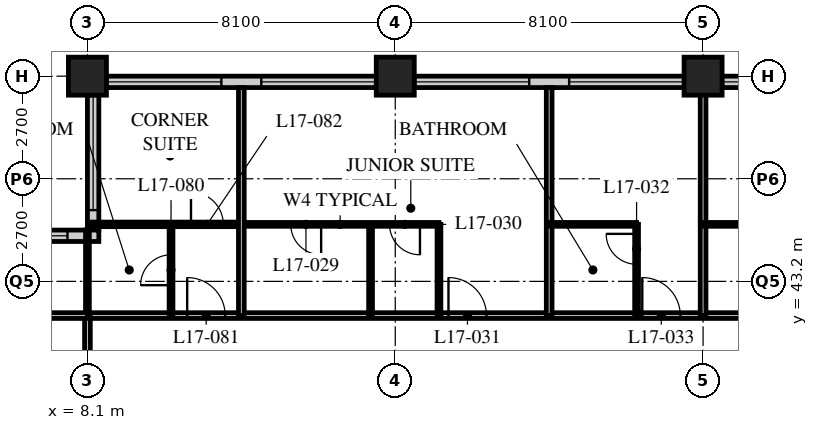
"""IFC4 building model, lengths in metres.
Left out: names, types, materials, properties, quantities, classifications, styles, units other than length and angle.
Written with IfcOpenShell. Run it as: python <this file> out.ifc"""

import sys

from ifc_helpers import new_model, si_unit, direction, frame, frame_2d, origin, origin_2d, place, context, subcontext, project, spatial, rectangle, hollow_rectangle, extrude, element, fill, save


model = new_model("IFC4")
c1 = context("Model", 3, precision=1e-05, world=origin(), true_north=direction((0.0, 1.0)))
c2 = subcontext(c1, "Body", "Model", "MODEL_VIEW")
j1 = project(units=[si_unit("LENGTHUNIT", "METRE"), si_unit("PLANEANGLEUNIT", "RADIAN")], contexts=[c1])
p1 = place(None, origin())
s1 = spatial("IfcSite", under=j1, at=p1, CompositionType="ELEMENT")
p2 = place(p1, origin())
s2 = spatial("IfcBuilding", under=s1, at=p2, CompositionType="ELEMENT")
p3 = place(p2, frame((0.0, 0.0, 70.4)))
s3 = spatial("IfcBuildingStorey", under=s2, at=p3, CompositionType="ELEMENT", Elevation=70.4)
for number, where, z_axis, x_axis in (
    (1, (8.1, 48.6, 0.0), (0.0, 0.0, 1.0), (1.0, 0.0, 0.0)),
    (2, (16.2, 48.6, 0.0), (0.0, 0.0, 1.0), (1.0, 0.0, 0.0)),
    (3, (24.3, 48.6, 0.0), (0.0, 0.0, 1.0), (1.0, 0.0, 0.0)),
):
    element("IfcColumn", number, at=place(p3, frame(where, z_axis=z_axis, x_axis=x_axis)), inside=s3, PredefinedType="COLUMN", context=c2, shape_type="SweptSolid", body=[
        extrude(hollow_rectangle(XDim=1.0, YDim=1.0, WallThickness=0.1, at=origin_2d()), origin(), (0.0, 0.0, 1.0), 3.4),
    ])
p4 = place(p3, frame((48.3, 48.45, 0.0), z_axis=(0.0, 0.0, 1.0), x_axis=(-1.0, 0.0, 0.0)))
e4 = element("IfcWall", 4, at=p4, inside=s3, PredefinedType="SOLIDWALL", context=c2, shape_type="SweptSolid", body=[
    extrude(rectangle(XDim=40.2, YDim=0.3, at=frame_2d((20.1, 0.0))), origin(), (0.0, 0.0, 1.0), 3.19),
])
p5 = place(p4, frame((0.225, 0.0, 0.9)))
e5 = element("IfcOpeningElement", 5, at=p5, cuts=e4, PredefinedType="OPENING", context=c2, shape_type="SweptSolid", body=[
    extrude(rectangle(XDim=3.0, YDim=2.0, at=frame_2d((1.5, 1.0))), frame((0.0, 0.16, 0.0), z_axis=(0.0, -1.0, 0.0), x_axis=(1.0, 0.0, 0.0)), (0.0, 0.0, 1.0), 0.32),
])
p6 = place(p4, frame((4.275, 0.0, 0.9)))
e6 = element("IfcOpeningElement", 6, at=p6, cuts=e4, PredefinedType="OPENING", context=c2, shape_type="SweptSolid", body=[
    extrude(rectangle(XDim=3.0, YDim=2.0, at=frame_2d((1.5, 1.0))), frame((0.0, 0.16, 0.0), z_axis=(0.0, -1.0, 0.0), x_axis=(1.0, 0.0, 0.0)), (0.0, 0.0, 1.0), 0.32),
])
p7 = place(p4, frame((8.325, 0.0, 0.9)))
e7 = element("IfcOpeningElement", 7, at=p7, cuts=e4, PredefinedType="OPENING", context=c2, shape_type="SweptSolid", body=[
    extrude(rectangle(XDim=3.0, YDim=2.0, at=frame_2d((1.5, 1.0))), frame((0.0, 0.16, 0.0), z_axis=(0.0, -1.0, 0.0), x_axis=(1.0, 0.0, 0.0)), (0.0, 0.0, 1.0), 0.32),
])
p8 = place(p4, frame((12.375, 0.0, 0.9)))
e8 = element("IfcOpeningElement", 8, at=p8, cuts=e4, PredefinedType="OPENING", context=c2, shape_type="SweptSolid", body=[
    extrude(rectangle(XDim=3.0, YDim=2.0, at=frame_2d((1.5, 1.0))), frame((0.0, 0.16, 0.0), z_axis=(0.0, -1.0, 0.0), x_axis=(1.0, 0.0, 0.0)), (0.0, 0.0, 1.0), 0.32),
])
p9 = place(p4, frame((16.425, 0.0, 0.9)))
e9 = element("IfcOpeningElement", 9, at=p9, cuts=e4, PredefinedType="OPENING", context=c2, shape_type="SweptSolid", body=[
    extrude(rectangle(XDim=3.0, YDim=2.0, at=frame_2d((1.5, 1.0))), frame((0.0, 0.16, 0.0), z_axis=(0.0, -1.0, 0.0), x_axis=(1.0, 0.0, 0.0)), (0.0, 0.0, 1.0), 0.32),
])
p10 = place(p4, frame((20.475, 0.0, 0.9)))
e10 = element("IfcOpeningElement", 10, at=p10, cuts=e4, PredefinedType="OPENING", context=c2, shape_type="SweptSolid", body=[
    extrude(rectangle(XDim=3.0, YDim=2.0, at=frame_2d((1.5, 1.0))), frame((0.0, 0.16, 0.0), z_axis=(0.0, -1.0, 0.0), x_axis=(1.0, 0.0, 0.0)), (0.0, 0.0, 1.0), 0.32),
])
p11 = place(p4, frame((24.525, 0.0, 0.9)))
e11 = element("IfcOpeningElement", 11, at=p11, cuts=e4, PredefinedType="OPENING", context=c2, shape_type="SweptSolid", body=[
    extrude(rectangle(XDim=3.0, YDim=2.0, at=frame_2d((1.5, 1.0))), frame((0.0, 0.16, 0.0), z_axis=(0.0, -1.0, 0.0), x_axis=(1.0, 0.0, 0.0)), (0.0, 0.0, 1.0), 0.32),
])
p12 = place(p4, frame((28.575, 0.0, 0.9)))
e12 = element("IfcOpeningElement", 12, at=p12, cuts=e4, PredefinedType="OPENING", context=c2, shape_type="SweptSolid", body=[
    extrude(rectangle(XDim=3.0, YDim=2.0, at=frame_2d((1.5, 1.0))), frame((0.0, 0.16, 0.0), z_axis=(0.0, -1.0, 0.0), x_axis=(1.0, 0.0, 0.0)), (0.0, 0.0, 1.0), 0.32),
])
p13 = place(p4, frame((32.625, 0.0, 0.9)))
e13 = element("IfcOpeningElement", 13, at=p13, cuts=e4, PredefinedType="OPENING", context=c2, shape_type="SweptSolid", body=[
    extrude(rectangle(XDim=3.0, YDim=2.0, at=frame_2d((1.5, 1.0))), frame((0.0, 0.16, 0.0), z_axis=(0.0, -1.0, 0.0), x_axis=(1.0, 0.0, 0.0)), (0.0, 0.0, 1.0), 0.32),
])
p14 = place(p4, frame((36.675, 0.0, 0.9)))
e14 = element("IfcOpeningElement", 14, at=p14, cuts=e4, PredefinedType="OPENING", context=c2, shape_type="SweptSolid", body=[
    extrude(rectangle(XDim=3.0, YDim=2.0, at=frame_2d((1.5, 1.0))), frame((0.0, 0.16, 0.0), z_axis=(0.0, -1.0, 0.0), x_axis=(1.0, 0.0, 0.0)), (0.0, 0.0, 1.0), 0.32),
])
p15 = place(p3, frame((8.25, 48.3, 0.0), z_axis=(0.0, 0.0, 1.0), x_axis=(0.0, -1.0, 0.0)))
e15 = element("IfcWall", 15, at=p15, inside=s3, PredefinedType="SOLIDWALL", context=c2, shape_type="SweptSolid", body=[
    extrude(rectangle(XDim=3.75, YDim=0.3, at=frame_2d((1.875, 0.0))), origin(), (0.0, 0.0, 1.0), 3.19),
])
p16 = place(p15, frame((0.225, 0.0, 0.9)))
e16 = element("IfcOpeningElement", 16, at=p16, cuts=e15, PredefinedType="OPENING", context=c2, shape_type="SweptSolid", body=[
    extrude(rectangle(XDim=3.0, YDim=1.5, at=frame_2d((1.5, 0.75))), frame((0.0, 0.16, 0.0), z_axis=(0.0, -1.0, 0.0), x_axis=(1.0, 0.0, 0.0)), (0.0, 0.0, 1.0), 0.32),
])
p17 = place(p3, frame((8.4, 44.4, 0.0), z_axis=(0.0, 0.0, 1.0), x_axis=(-1.0, 0.0, 0.0)))
e17 = element("IfcWall", 17, at=p17, inside=s3, PredefinedType="SOLIDWALL", context=c2, shape_type="SweptSolid", body=[
    extrude(rectangle(XDim=4.35, YDim=0.3, at=frame_2d((2.175, 0.0))), origin(), (0.0, 0.0, 1.0), 3.19),
])
p18 = place(p17, frame((0.825, 0.0, 0.9)))
e18 = element("IfcOpeningElement", 18, at=p18, cuts=e17, PredefinedType="OPENING", context=c2, shape_type="SweptSolid", body=[
    extrude(rectangle(XDim=3.0, YDim=1.5, at=frame_2d((1.5, 0.75))), frame((0.0, 0.16, 0.0), z_axis=(0.0, -1.0, 0.0), x_axis=(1.0, 0.0, 0.0)), (0.0, 0.0, 1.0), 0.32),
])
p19 = place(p3, frame((8.1, 42.3, 0.0), z_axis=(0.0, 0.0, 1.0), x_axis=(1.0, 0.0, 0.0)))
e19 = element("IfcWall", 19, at=p19, inside=s3, PredefinedType="PARTITIONING", context=c2, shape_type="SweptSolid", body=[
    extrude(rectangle(XDim=36.45, YDim=0.15, at=frame_2d((18.225, 0.0))), origin(), (0.0, 0.0, 1.0), 3.19),
])
p20 = place(p19, frame((9.5, 0.0, 0.0)))
e20 = element("IfcOpeningElement", 20, at=p20, cuts=e19, PredefinedType="OPENING", context=c2, shape_type="SweptSolid", body=[
    extrude(rectangle(XDim=1.0, YDim=2.1, at=frame_2d((0.5, 1.05))), frame((0.0, 0.085, 0.0), z_axis=(0.0, -1.0, 0.0), x_axis=(1.0, 0.0, 0.0)), (0.0, 0.0, 1.0), 0.17),
])
p21 = place(p19, frame((14.6, 0.0, 0.0)))
e21 = element("IfcOpeningElement", 21, at=p21, cuts=e19, PredefinedType="OPENING", context=c2, shape_type="SweptSolid", body=[
    extrude(rectangle(XDim=1.0, YDim=2.1, at=frame_2d((0.5, 1.05))), frame((0.0, 0.085, 0.0), z_axis=(0.0, -1.0, 0.0), x_axis=(1.0, 0.0, 0.0)), (0.0, 0.0, 1.0), 0.17),
])
p22 = place(p19, frame((18.65, 0.0, 0.0)))
e22 = element("IfcOpeningElement", 22, at=p22, cuts=e19, PredefinedType="OPENING", context=c2, shape_type="SweptSolid", body=[
    extrude(rectangle(XDim=1.0, YDim=2.1, at=frame_2d((0.5, 1.05))), frame((0.0, 0.085, 0.0), z_axis=(0.0, -1.0, 0.0), x_axis=(1.0, 0.0, 0.0)), (0.0, 0.0, 1.0), 0.17),
])
p23 = place(p19, frame((25.7, 0.0, 0.0)))
e23 = element("IfcOpeningElement", 23, at=p23, cuts=e19, PredefinedType="OPENING", context=c2, shape_type="SweptSolid", body=[
    extrude(rectangle(XDim=1.0, YDim=2.1, at=frame_2d((0.5, 1.05))), frame((0.0, 0.085, 0.0), z_axis=(0.0, -1.0, 0.0), x_axis=(1.0, 0.0, 0.0)), (0.0, 0.0, 1.0), 0.17),
])
p24 = place(p19, frame((30.8, 0.0, 0.0)))
e24 = element("IfcOpeningElement", 24, at=p24, cuts=e19, PredefinedType="OPENING", context=c2, shape_type="SweptSolid", body=[
    extrude(rectangle(XDim=1.0, YDim=2.1, at=frame_2d((0.5, 1.05))), frame((0.0, 0.085, 0.0), z_axis=(0.0, -1.0, 0.0), x_axis=(1.0, 0.0, 0.0)), (0.0, 0.0, 1.0), 0.17),
])
p25 = place(p19, frame((32.825, 0.0, 0.0)))
e25 = element("IfcOpeningElement", 25, at=p25, cuts=e19, PredefinedType="OPENING", context=c2, shape_type="SweptSolid", body=[
    extrude(rectangle(XDim=1.0, YDim=2.1, at=frame_2d((0.5, 1.05))), frame((0.0, 0.085, 0.0), z_axis=(0.0, -1.0, 0.0), x_axis=(1.0, 0.0, 0.0)), (0.0, 0.0, 1.0), 0.17),
])
p26 = place(p19, frame((2.625, 0.0, 0.0)))
e26 = element("IfcOpeningElement", 26, at=p26, cuts=e19, PredefinedType="OPENING", context=c2, shape_type="SweptSolid", body=[
    extrude(rectangle(XDim=1.0, YDim=2.1, at=frame_2d((0.5, 1.05))), frame((0.0, 0.085, 0.0), z_axis=(0.0, -1.0, 0.0), x_axis=(1.0, 0.0, 0.0)), (0.0, 0.0, 1.0), 0.17),
])
p27 = place(p3, frame((8.1, 12.15, 0.0), z_axis=(0.0, 0.0, 1.0), x_axis=(0.0, 1.0, 0.0)))
e27 = element("IfcWall", 27, at=p27, inside=s3, PredefinedType="PARTITIONING", context=c2, shape_type="SweptSolid", body=[
    extrude(rectangle(XDim=30.15, YDim=0.15, at=frame_2d((15.075, 0.0))), origin(), (0.0, 0.0, 1.0), 2.578),
])
p28 = place(p27, frame((0.6, 0.0, 0.0)))
e28 = element("IfcOpeningElement", 28, at=p28, cuts=e27, PredefinedType="OPENING", context=c2, shape_type="SweptSolid", body=[
    extrude(rectangle(XDim=1.0, YDim=2.1, at=frame_2d((0.5, 1.05))), frame((0.0, 0.085, 0.0), z_axis=(0.0, -1.0, 0.0), x_axis=(1.0, 0.0, 0.0)), (0.0, 0.0, 1.0), 0.17),
])
p29 = place(p27, frame((6.8, 0.0, 0.0)))
e29 = element("IfcOpeningElement", 29, at=p29, cuts=e27, PredefinedType="OPENING", context=c2, shape_type="SweptSolid", body=[
    extrude(rectangle(XDim=1.0, YDim=2.1, at=frame_2d((0.5, 1.05))), frame((0.0, 0.085, 0.0), z_axis=(0.0, -1.0, 0.0), x_axis=(1.0, 0.0, 0.0)), (0.0, 0.0, 1.0), 0.17),
])
p30 = place(p27, frame((8.7, 0.0, 0.0)))
e30 = element("IfcOpeningElement", 30, at=p30, cuts=e27, PredefinedType="OPENING", context=c2, shape_type="SweptSolid", body=[
    extrude(rectangle(XDim=1.0, YDim=2.1, at=frame_2d((0.5, 1.05))), frame((0.0, 0.085, 0.0), z_axis=(0.0, -1.0, 0.0), x_axis=(1.0, 0.0, 0.0)), (0.0, 0.0, 1.0), 0.17),
])
p31 = place(p27, frame((14.6, 0.0, 0.0)))
e31 = element("IfcOpeningElement", 31, at=p31, cuts=e27, PredefinedType="OPENING", context=c2, shape_type="SweptSolid", body=[
    extrude(rectangle(XDim=1.0, YDim=2.1, at=frame_2d((0.5, 1.05))), frame((0.0, 0.085, 0.0), z_axis=(0.0, -1.0, 0.0), x_axis=(1.0, 0.0, 0.0)), (0.0, 0.0, 1.0), 0.17),
])
p32 = place(p27, frame((21.65, 0.0, 0.0)))
e32 = element("IfcOpeningElement", 32, at=p32, cuts=e27, PredefinedType="OPENING", context=c2, shape_type="SweptSolid", body=[
    extrude(rectangle(XDim=1.0, YDim=2.1, at=frame_2d((0.5, 1.05))), frame((0.0, 0.085, 0.0), z_axis=(0.0, -1.0, 0.0), x_axis=(1.0, 0.0, 0.0)), (0.0, 0.0, 1.0), 0.17),
])
p33 = place(p27, frame((26.75, 0.0, 0.0)))
e33 = element("IfcOpeningElement", 33, at=p33, cuts=e27, PredefinedType="OPENING", context=c2, shape_type="SweptSolid", body=[
    extrude(rectangle(XDim=1.0, YDim=2.1, at=frame_2d((0.5, 1.05))), frame((0.0, 0.085, 0.0), z_axis=(0.0, -1.0, 0.0), x_axis=(1.0, 0.0, 0.0)), (0.0, 0.0, 1.0), 0.17),
])
p34 = place(p3, frame((12.15, 44.7, 0.0), z_axis=(0.0, 0.0, 1.0), x_axis=(1.0, 0.0, 0.0)))
e34 = element("IfcWall", 34, at=p34, inside=s3, PredefinedType="PARTITIONING", context=c2, shape_type="SweptSolid", body=[
    extrude(rectangle(XDim=5.2, YDim=0.1, at=frame_2d((2.6, 0.0))), origin(), (0.0, 0.0, 1.0), 3.19),
])
p35 = place(p34, frame((1.3, 0.0, 0.0)))
e35 = element("IfcOpeningElement", 35, at=p35, cuts=e34, PredefinedType="OPENING", context=c2, shape_type="SweptSolid", body=[
    extrude(rectangle(XDim=0.8, YDim=2.1, at=frame_2d((0.4, 1.05))), frame((0.0, 0.06, 0.0), z_axis=(0.0, -1.0, 0.0), x_axis=(1.0, 0.0, 0.0)), (0.0, 0.0, 1.0), 0.12),
])
p36 = place(p34, frame((3.9, 0.0, 0.0)))
e36 = element("IfcOpeningElement", 36, at=p36, cuts=e34, PredefinedType="OPENING", context=c2, shape_type="SweptSolid", body=[
    extrude(rectangle(XDim=0.8, YDim=2.1, at=frame_2d((0.4, 1.05))), frame((0.0, 0.06, 0.0), z_axis=(0.0, -1.0, 0.0), x_axis=(1.0, 0.0, 0.0)), (0.0, 0.0, 1.0), 0.12),
])
for number, where, z_axis, x_axis in (
    (37, (15.55, 42.3, 0.0), (0.0, 0.0, 1.0), (0.0, 1.0, 0.0)),
    (38, (17.35, 42.3, 0.0), (0.0, 0.0, 1.0), (0.0, 1.0, 0.0)),
):
    element("IfcWall", number, at=place(p3, frame(where, z_axis=z_axis, x_axis=x_axis)), inside=s3, PredefinedType="PARTITIONING", context=c2, shape_type="SweptSolid", body=[
        extrude(rectangle(XDim=2.4, YDim=0.1, at=frame_2d((1.2, 0.0))), origin(), (0.0, 0.0, 1.0), 3.19),
    ])
p37 = place(p3, frame((20.25, 42.3, 0.0), z_axis=(0.0, 0.0, 1.0), x_axis=(0.0, 1.0, 0.0)))
e39 = element("IfcWall", 39, at=p37, inside=s3, PredefinedType="PARTITIONING", context=c2, shape_type="SweptSolid", body=[
    extrude(rectangle(XDim=6.0, YDim=0.15, at=frame_2d((3.0, 0.0))), origin(), (0.0, 0.0, 1.0), 3.19),
])
p38 = place(p3, frame((20.25, 44.7, 0.0), z_axis=(0.0, 0.0, 1.0), x_axis=(1.0, 0.0, 0.0)))
e40 = element("IfcWall", 40, at=p38, inside=s3, PredefinedType="PARTITIONING", context=c2, shape_type="SweptSolid", body=[
    extrude(rectangle(XDim=2.3, YDim=0.1, at=frame_2d((1.15, 0.0))), origin(), (0.0, 0.0, 1.0), 3.19),
])
p39 = place(p3, frame((22.55, 42.3, 0.0), z_axis=(0.0, 0.0, 1.0), x_axis=(0.0, 1.0, 0.0)))
e41 = element("IfcWall", 41, at=p39, inside=s3, PredefinedType="PARTITIONING", context=c2, shape_type="SweptSolid", body=[
    extrude(rectangle(XDim=2.4, YDim=0.1, at=frame_2d((1.2, 0.0))), origin(), (0.0, 0.0, 1.0), 3.19),
])
p40 = place(p39, frame((1.35, 0.0, 0.0)))
e42 = element("IfcOpeningElement", 42, at=p40, cuts=e41, PredefinedType="OPENING", context=c2, shape_type="SweptSolid", body=[
    extrude(rectangle(XDim=0.8, YDim=2.1, at=frame_2d((0.4, 1.05))), frame((0.0, 0.06, 0.0), z_axis=(0.0, -1.0, 0.0), x_axis=(1.0, 0.0, 0.0)), (0.0, 0.0, 1.0), 0.12),
])
p41 = place(p3, frame((24.3, 42.3, 0.0), z_axis=(0.0, 0.0, 1.0), x_axis=(0.0, 1.0, 0.0)))
e43 = element("IfcWall", 43, at=p41, inside=s3, PredefinedType="PARTITIONING", context=c2, shape_type="SweptSolid", body=[
    extrude(rectangle(XDim=6.0, YDim=0.15, at=frame_2d((3.0, 0.0))), origin(), (0.0, 0.0, 1.0), 2.578),
])
p42 = place(p3, frame((24.3, 44.7, 0.0), z_axis=(0.0, 0.0, 1.0), x_axis=(1.0, 0.0, 0.0)))
e44 = element("IfcWall", 44, at=p42, inside=s3, PredefinedType="PARTITIONING", context=c2, shape_type="SweptSolid", body=[
    extrude(rectangle(XDim=2.3, YDim=0.1, at=frame_2d((1.15, 0.0))), origin(), (0.0, 0.0, 1.0), 3.19),
])
p43 = place(p3, frame((8.1, 44.7, 0.0), z_axis=(0.0, 0.0, 1.0), x_axis=(1.0, 0.0, 0.0)))
e45 = element("IfcWall", 45, at=p43, inside=s3, PredefinedType="PARTITIONING", context=c2, shape_type="SweptSolid", body=[
    extrude(rectangle(XDim=4.05, YDim=0.12, at=frame_2d((2.025, 0.0))), origin(), (0.0, 0.0, 1.0), 3.19),
])
p44 = place(p43, frame((2.725, 0.0, 0.0)))
e46 = element("IfcOpeningElement", 46, at=p44, cuts=e45, PredefinedType="OPENING", context=c2, shape_type="SweptSolid", body=[
    extrude(rectangle(XDim=0.85, YDim=2.1, at=frame_2d((0.425, 1.05))), frame((0.0, 0.07, 0.0), z_axis=(0.0, -1.0, 0.0), x_axis=(1.0, 0.0, 0.0)), (0.0, 0.0, 1.0), 0.14),
])
p45 = place(p3, frame((10.3, 42.3, 0.0), z_axis=(0.0, 0.0, 1.0), x_axis=(0.0, 1.0, 0.0)))
e47 = element("IfcWall", 47, at=p45, inside=s3, PredefinedType="PARTITIONING", context=c2, shape_type="SweptSolid", body=[
    extrude(rectangle(XDim=2.4, YDim=0.1, at=frame_2d((1.2, 0.0))), origin(), (0.0, 0.0, 1.0), 3.19),
])
p46 = place(p45, frame((0.8, 0.0, 0.0)))
e48 = element("IfcOpeningElement", 48, at=p46, cuts=e47, PredefinedType="OPENING", context=c2, shape_type="SweptSolid", body=[
    extrude(rectangle(XDim=0.8, YDim=2.1, at=frame_2d((0.4, 1.05))), frame((0.0, 0.06, 0.0), z_axis=(0.0, -1.0, 0.0), x_axis=(1.0, 0.0, 0.0)), (0.0, 0.0, 1.0), 0.12),
])
p47 = place(p3, frame((8.1, 42.3, 0.0), z_axis=(0.0, 0.0, 1.0), x_axis=(0.0, 1.0, 0.0)))
e49 = element("IfcWall", 49, at=p47, inside=s3, PredefinedType="PARTITIONING", context=c2, shape_type="SweptSolid", body=[
    extrude(rectangle(XDim=2.25, YDim=0.1, at=frame_2d((1.125, 0.0))), origin(), (0.0, 0.0, 1.0), 2.578),
])
p48 = place(p3, frame((4.35, 42.3, 0.0), z_axis=(0.0, 0.0, 1.0), x_axis=(1.0, 0.0, 0.0)))
e50 = element("IfcWall", 50, at=p48, inside=s3, PredefinedType="PARTITIONING", context=c2, shape_type="SweptSolid", body=[
    extrude(rectangle(XDim=3.75, YDim=0.15, at=frame_2d((1.875, 0.0))), origin(), (0.0, 0.0, 1.0), 3.19),
])
p49 = place(p3, frame((12.15, 42.3, 0.0), z_axis=(0.0, 0.0, 1.0), x_axis=(0.0, 1.0, 0.0)))
e51 = element("IfcWall", 51, at=p49, inside=s3, PredefinedType="PARTITIONING", context=c2, shape_type="SweptSolid", body=[
    extrude(rectangle(XDim=6.0, YDim=0.15, at=frame_2d((3.0, 0.0))), origin(), (0.0, 0.0, 1.0), 3.19),
])
p50 = place(p10, origin())
e52 = element("IfcWindow", 52, at=p50, inside=s3, PartitioningType="SINGLE_PANEL", PredefinedType="WINDOW", context=c2, shape_type="SweptSolid", body=[
    extrude(rectangle(XDim=3.0, YDim=2.0, at=frame_2d((1.5, 1.0))), frame((0.0, 0.03, 0.0), z_axis=(0.0, -1.0, 0.0), x_axis=(1.0, 0.0, 0.0)), (0.0, 0.0, 1.0), 0.06),
])
fill(e10, e52)
p51 = place(p11, origin())
e53 = element("IfcWindow", 53, at=p51, inside=s3, PartitioningType="SINGLE_PANEL", PredefinedType="WINDOW", context=c2, shape_type="SweptSolid", body=[
    extrude(rectangle(XDim=3.0, YDim=2.0, at=frame_2d((1.5, 1.0))), frame((0.0, 0.03, 0.0), z_axis=(0.0, -1.0, 0.0), x_axis=(1.0, 0.0, 0.0)), (0.0, 0.0, 1.0), 0.06),
])
fill(e11, e53)
p52 = place(p12, origin())
e54 = element("IfcWindow", 54, at=p52, inside=s3, PartitioningType="SINGLE_PANEL", PredefinedType="WINDOW", context=c2, shape_type="SweptSolid", body=[
    extrude(rectangle(XDim=3.0, YDim=2.0, at=frame_2d((1.5, 1.0))), frame((0.0, 0.03, 0.0), z_axis=(0.0, -1.0, 0.0), x_axis=(1.0, 0.0, 0.0)), (0.0, 0.0, 1.0), 0.06),
])
fill(e12, e54)
p53 = place(p13, origin())
e55 = element("IfcWindow", 55, at=p53, inside=s3, PartitioningType="SINGLE_PANEL", PredefinedType="WINDOW", context=c2, shape_type="SweptSolid", body=[
    extrude(rectangle(XDim=3.0, YDim=2.0, at=frame_2d((1.5, 1.0))), frame((0.0, 0.03, 0.0), z_axis=(0.0, -1.0, 0.0), x_axis=(1.0, 0.0, 0.0)), (0.0, 0.0, 1.0), 0.06),
])
fill(e13, e55)
p54 = place(p14, origin())
e56 = element("IfcWindow", 56, at=p54, inside=s3, PartitioningType="SINGLE_PANEL", PredefinedType="WINDOW", context=c2, shape_type="SweptSolid", body=[
    extrude(rectangle(XDim=3.0, YDim=2.0, at=frame_2d((1.5, 1.0))), frame((0.0, 0.03, 0.0), z_axis=(0.0, -1.0, 0.0), x_axis=(1.0, 0.0, 0.0)), (0.0, 0.0, 1.0), 0.06),
])
fill(e14, e56)
p55 = place(p16, origin())
e57 = element("IfcWindow", 57, at=p55, inside=s3, PartitioningType="SINGLE_PANEL", PredefinedType="WINDOW", context=c2, shape_type="SweptSolid", body=[
    extrude(rectangle(XDim=3.0, YDim=1.5, at=frame_2d((1.5, 0.75))), frame((0.0, 0.03, 0.0), z_axis=(0.0, -1.0, 0.0), x_axis=(1.0, 0.0, 0.0)), (0.0, 0.0, 1.0), 0.06),
])
fill(e16, e57)
p56 = place(p18, origin())
e58 = element("IfcWindow", 58, at=p56, inside=s3, PartitioningType="SINGLE_PANEL", PredefinedType="WINDOW", context=c2, shape_type="SweptSolid", body=[
    extrude(rectangle(XDim=3.0, YDim=1.5, at=frame_2d((1.5, 0.75))), frame((0.0, 0.03, 0.0), z_axis=(0.0, -1.0, 0.0), x_axis=(1.0, 0.0, 0.0)), (0.0, 0.0, 1.0), 0.06),
])
fill(e18, e58)
p57 = place(p35, origin())
e59 = element("IfcDoor", 59, at=p57, inside=s3, OperationType="SINGLE_SWING_LEFT", PredefinedType="DOOR", context=c2, shape_type="SweptSolid", body=[
    extrude(rectangle(XDim=0.8, YDim=2.1, at=frame_2d((0.4, 1.05))), frame((0.0, 0.025, 0.0), z_axis=(0.0, -1.0, 0.0), x_axis=(1.0, 0.0, 0.0)), (0.0, 0.0, 1.0), 0.05),
])
fill(e35, e59)
p58 = place(p36, origin())
e60 = element("IfcDoor", 60, at=p58, inside=s3, OperationType="SINGLE_SWING_LEFT", PredefinedType="DOOR", context=c2, shape_type="SweptSolid", body=[
    extrude(rectangle(XDim=0.8, YDim=2.1, at=frame_2d((0.4, 1.05))), frame((0.0, 0.025, 0.0), z_axis=(0.0, -1.0, 0.0), x_axis=(1.0, 0.0, 0.0)), (0.0, 0.0, 1.0), 0.05),
])
fill(e36, e60)
p59 = place(p20, origin())
e61 = element("IfcDoor", 61, at=p59, inside=s3, OperationType="SINGLE_SWING_LEFT", PredefinedType="DOOR", context=c2, shape_type="SweptSolid", body=[
    extrude(rectangle(XDim=1.0, YDim=2.1, at=frame_2d((0.5, 1.05))), frame((0.0, 0.025, 0.0), z_axis=(0.0, -1.0, 0.0), x_axis=(1.0, 0.0, 0.0)), (0.0, 0.0, 1.0), 0.05),
])
fill(e20, e61)
p60 = place(p40, origin())
e62 = element("IfcDoor", 62, at=p60, inside=s3, OperationType="SINGLE_SWING_RIGHT", PredefinedType="DOOR", context=c2, shape_type="SweptSolid", body=[
    extrude(rectangle(XDim=0.8, YDim=2.1, at=frame_2d((0.4, 1.05))), frame((0.0, 0.025, 0.0), z_axis=(0.0, -1.0, 0.0), x_axis=(1.0, 0.0, 0.0)), (0.0, 0.0, 1.0), 0.05),
])
fill(e42, e62)
p61 = place(p21, origin())
e63 = element("IfcDoor", 63, at=p61, inside=s3, OperationType="SINGLE_SWING_LEFT", PredefinedType="DOOR", context=c2, shape_type="SweptSolid", body=[
    extrude(rectangle(XDim=1.0, YDim=2.1, at=frame_2d((0.5, 1.05))), frame((0.0, 0.025, 0.0), z_axis=(0.0, -1.0, 0.0), x_axis=(1.0, 0.0, 0.0)), (0.0, 0.0, 1.0), 0.05),
])
fill(e21, e63)
p62 = place(p46, origin())
e64 = element("IfcDoor", 64, at=p62, inside=s3, OperationType="SINGLE_SWING_LEFT", PredefinedType="DOOR", context=c2, shape_type="SweptSolid", body=[
    extrude(rectangle(XDim=0.8, YDim=2.1, at=frame_2d((0.4, 1.05))), frame((0.0, 0.025, 0.0), z_axis=(0.0, -1.0, 0.0), x_axis=(1.0, 0.0, 0.0)), (0.0, 0.0, 1.0), 0.05),
])
fill(e48, e64)
p63 = place(p26, origin())
e65 = element("IfcDoor", 65, at=p63, inside=s3, OperationType="SINGLE_SWING_LEFT", PredefinedType="DOOR", context=c2, shape_type="SweptSolid", body=[
    extrude(rectangle(XDim=1.0, YDim=2.1, at=frame_2d((0.5, 1.05))), frame((0.0, 0.025, 0.0), z_axis=(0.0, -1.0, 0.0), x_axis=(1.0, 0.0, 0.0)), (0.0, 0.0, 1.0), 0.05),
])
fill(e26, e65)
p64 = place(p44, origin())
e66 = element("IfcDoor", 66, at=p64, inside=s3, OperationType="SINGLE_SWING_LEFT", PredefinedType="DOOR", context=c2, shape_type="SweptSolid", body=[
    extrude(rectangle(XDim=0.85, YDim=2.1, at=frame_2d((0.425, 1.05))), frame((0.0, 0.025, 0.0), z_axis=(0.0, -1.0, 0.0), x_axis=(1.0, 0.0, 0.0)), (0.0, 0.0, 1.0), 0.05),
])
fill(e46, e66)
save(model, sys.argv[1])
